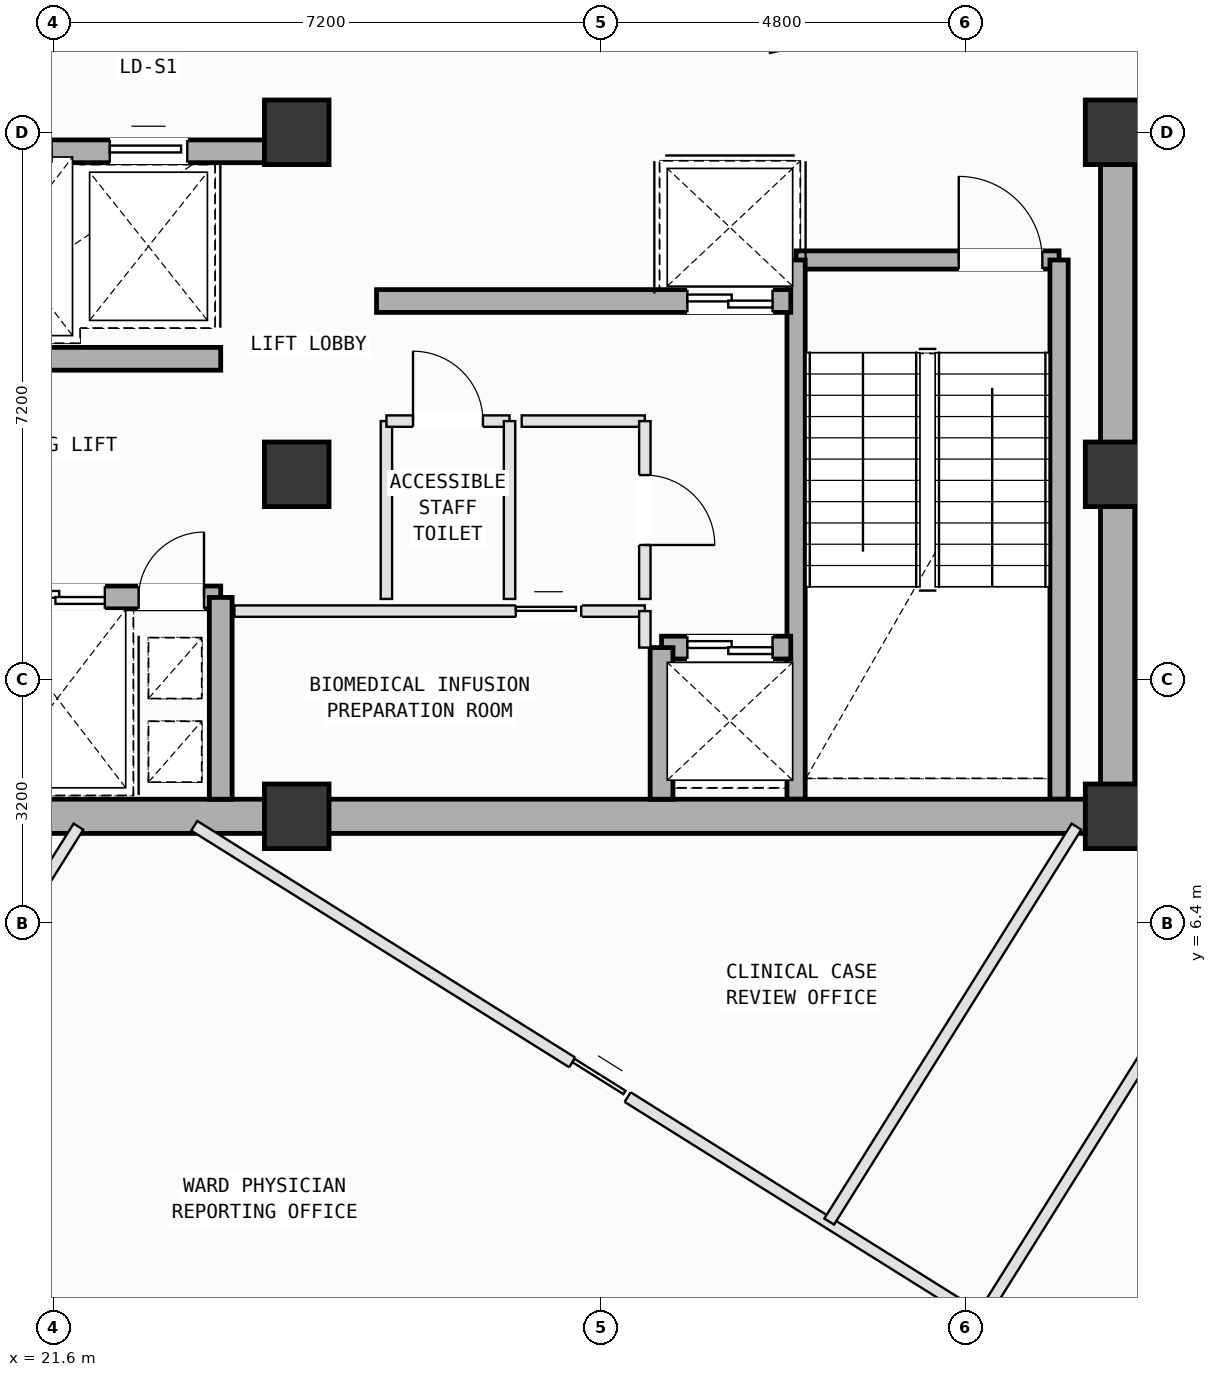
"""IFC4 building model, lengths in metres.
Left out: names, types, materials, properties, quantities, classifications, styles, units other than length and angle.
Written with IfcOpenShell. Run it as: python <this file> out.ifc"""

import sys

from ifc_helpers import new_model, si_unit, direction, frame, frame_2d, origin, origin_2d, place, context, subcontext, project, spatial, rectangle, extrude, element, fill, save


model = new_model("IFC4")
c1 = context("Model", 3, precision=1e-05, world=origin(), true_north=direction((0.0, 1.0)))
c2 = subcontext(c1, "Body", "Model", "MODEL_VIEW")
j1 = project(units=[si_unit("LENGTHUNIT", "METRE"), si_unit("PLANEANGLEUNIT", "RADIAN")], contexts=[c1])
p1 = place(None, origin())
s1 = spatial("IfcSite", under=j1, at=p1, CompositionType="ELEMENT")
p2 = place(p1, origin())
s2 = spatial("IfcBuilding", under=s1, at=p2, CompositionType="ELEMENT")
p3 = place(p2, frame((0.0, 0.0, 272.6)))
s3 = spatial("IfcBuildingStorey", under=s2, at=p3, CompositionType="ELEMENT", Elevation=272.6)
for number, where, z_axis, x_axis in (
    (1, (24.8, 7.8, 0.0), (0.0, 0.0, 1.0), (1.0, 0.0, 0.0)),
    (2, (24.8, 12.3, 0.0), (0.0, 0.0, 1.0), (1.0, 0.0, 0.0)),
    (3, (24.8, 16.8, 0.0), (0.0, 0.0, 1.0), (1.0, 0.0, 0.0)),
    (4, (35.6, 7.8, 0.0), (0.0, 0.0, 1.0), (1.0, 0.0, 0.0)),
    (5, (35.6, 12.3, 0.0), (0.0, 0.0, 1.0), (1.0, 0.0, 0.0)),
    (6, (35.6, 16.8, 0.0), (0.0, 0.0, 1.0), (1.0, 0.0, 0.0)),
):
    element("IfcColumn", number, at=place(p3, frame(where, z_axis=z_axis, x_axis=x_axis)), inside=s3, PredefinedType="COLUMN", context=c2, shape_type="SweptSolid", body=[
        extrude(rectangle(XDim=0.85, YDim=0.85, at=origin_2d()), origin(), (0.0, 0.0, 1.0), 4.0),
    ])
p4 = place(p3, frame((24.317, -1.774, 0.0), z_axis=(0.0, 0.0, 1.0), x_axis=(-0.847587721297, 0.530655306867, 0.0)))
e7 = element("IfcWall", 7, at=p4, inside=s3, PredefinedType="SOLIDWALL", context=c2, shape_type="SweptSolid", body=[
    extrude(rectangle(XDim=7.153, YDim=0.28, at=frame_2d((3.577, 0.0))), origin(), (0.0, 0.0, 1.0), 3.265),
])
p5 = place(p4, frame((2.813, 0.0, 0.75)))
e8 = element("IfcOpeningElement", 8, at=p5, cuts=e7, PredefinedType="OPENING", context=c2, shape_type="SweptSolid", body=[
    extrude(rectangle(XDim=1.2, YDim=1.75, at=frame_2d((0.6, 0.875))), frame((0.0, 0.15, 0.0), z_axis=(0.0, -1.0, 0.0), x_axis=(1.0, 0.0, 0.0)), (0.0, 0.0, 1.0), 0.3),
])
p6 = place(p4, frame((0.742, 0.0, 0.75)))
e9 = element("IfcOpeningElement", 9, at=p6, cuts=e7, PredefinedType="OPENING", context=c2, shape_type="SweptSolid", body=[
    extrude(rectangle(XDim=1.2, YDim=1.75, at=frame_2d((0.6, 0.875))), frame((0.0, 0.15, 0.0), z_axis=(0.0, -1.0, 0.0), x_axis=(1.0, 0.0, 0.0)), (0.0, 0.0, 1.0), 0.3),
])
p7 = place(p3, frame((31.37, 15.12, 0.0), z_axis=(0.0, 0.0, 1.0), x_axis=(1.0, 0.0, 0.0)))
e10 = element("IfcWall", 10, at=p7, inside=s3, PredefinedType="SOLIDWALL", context=c2, shape_type="SweptSolid", body=[
    extrude(rectangle(XDim=3.46, YDim=0.24, at=frame_2d((1.73, 0.0))), origin(), (0.0, 0.0, 1.0), 3.78),
])
p8 = place(p7, frame((2.14, 0.0, 0.0)))
e11 = element("IfcOpeningElement", 11, at=p8, cuts=e10, PredefinedType="OPENING", context=c2, shape_type="SweptSolid", body=[
    extrude(rectangle(XDim=1.1, YDim=2.15, at=frame_2d((0.55, 1.075))), frame((0.0, 0.13, 0.0), z_axis=(0.0, -1.0, 0.0), x_axis=(1.0, 0.0, 0.0)), (0.0, 0.0, 1.0), 0.26),
])
for number, where, z_axis, x_axis in (
    (12, (34.83, 15.12, 0.0), (0.0, 0.0, 1.0), (0.0, -1.0, 0.0)),
    (13, (31.37, 8.025, 0.0), (0.0, 0.0, 1.0), (0.0, 1.0, 0.0)),
):
    element("IfcWall", number, at=place(p3, frame(where, z_axis=z_axis, x_axis=x_axis)), inside=s3, PredefinedType="SOLIDWALL", context=c2, shape_type="SweptSolid", body=[
        extrude(rectangle(XDim=7.095, YDim=0.24, at=frame_2d((3.548, 0.0))), origin(), (0.0, 0.0, 1.0), 3.78),
    ])
for number, where, z_axis, x_axis in (
    (14, (14.0, 7.8, 0.0), (0.0, 0.0, 1.0), (1.0, 0.0, 0.0)),
    (15, (24.8, 7.8, 0.0), (0.0, 0.0, 1.0), (1.0, 0.0, 0.0)),
):
    element("IfcWall", number, at=place(p3, frame(where, z_axis=z_axis, x_axis=x_axis)), inside=s3, PredefinedType="SHEAR", context=c2, shape_type="SweptSolid", body=[
        extrude(rectangle(XDim=10.8, YDim=0.45, at=frame_2d((5.4, 0.0))), origin(), (0.0, 0.0, 1.0), 3.78),
    ])
p9 = place(p3, frame((35.6, 7.8, 0.0), z_axis=(0.0, 0.0, 1.0), x_axis=(0.0, 1.0, 0.0)))
e16 = element("IfcWall", 16, at=p9, inside=s3, PredefinedType="SHEAR", context=c2, shape_type="SweptSolid", body=[
    extrude(rectangle(XDim=9.0, YDim=0.45, at=frame_2d((4.5, 0.0))), origin(), (0.0, 0.0, 1.0), 3.78),
])
p10 = place(p3, frame((19.85, 16.55, 0.0), z_axis=(0.0, 0.0, 1.0), x_axis=(1.0, 0.0, 0.0)))
e17 = element("IfcWall", 17, at=p10, inside=s3, PredefinedType="SOLIDWALL", context=c2, shape_type="SweptSolid", body=[
    extrude(rectangle(XDim=4.525, YDim=0.3, at=frame_2d((2.262, 0.0))), origin(), (0.0, 0.0, 1.0), 3.78),
])
p11 = place(p10, frame((0.475, 0.0, 0.0)))
e18 = element("IfcOpeningElement", 18, at=p11, cuts=e17, PredefinedType="OPENING", context=c2, shape_type="SweptSolid", body=[
    extrude(rectangle(XDim=1.25, YDim=2.18, at=frame_2d((0.625, 1.09))), frame((0.0, 0.16, 0.0), z_axis=(0.0, -1.0, 0.0), x_axis=(1.0, 0.0, 0.0)), (0.0, 0.0, 1.0), 0.32),
])
p12 = place(p10, frame((2.49, 0.0, 0.0)))
e19 = element("IfcOpeningElement", 19, at=p12, cuts=e17, PredefinedType="OPENING", context=c2, shape_type="SweptSolid", body=[
    extrude(rectangle(XDim=1.02, YDim=2.12, at=frame_2d((0.51, 1.06))), frame((0.0, 0.16, 0.0), z_axis=(0.0, -1.0, 0.0), x_axis=(1.0, 0.0, 0.0)), (0.0, 0.0, 1.0), 0.32),
])
p13 = place(p3, frame((18.5, 10.68, 0.0), z_axis=(0.0, 0.0, 1.0), x_axis=(1.0, 0.0, 0.0)))
e20 = element("IfcWall", 20, at=p13, inside=s3, PredefinedType="SOLIDWALL", context=c2, shape_type="SweptSolid", body=[
    extrude(rectangle(XDim=5.3, YDim=0.3, at=frame_2d((2.65, 0.0))), origin(), (0.0, 0.0, 1.0), 3.78),
])
p14 = place(p13, frame((4.22, 0.0, 0.0)))
e21 = element("IfcOpeningElement", 21, at=p14, cuts=e20, PredefinedType="OPENING", context=c2, shape_type="SweptSolid", body=[
    extrude(rectangle(XDim=0.86, YDim=2.06, at=frame_2d((0.43, 1.03))), frame((0.0, 0.16, 0.0), z_axis=(0.0, -1.0, 0.0), x_axis=(1.0, 0.0, 0.0)), (0.0, 0.0, 1.0), 0.32),
])
p15 = place(p13, frame((0.425, 0.0, 0.0)))
e22 = element("IfcOpeningElement", 22, at=p15, cuts=e20, PredefinedType="OPENING", context=c2, shape_type="SweptSolid", body=[
    extrude(rectangle(XDim=1.25, YDim=2.18, at=frame_2d((0.625, 1.09))), frame((0.0, 0.16, 0.0), z_axis=(0.0, -1.0, 0.0), x_axis=(1.0, 0.0, 0.0)), (0.0, 0.0, 1.0), 0.32),
])
p16 = place(p13, frame((2.525, 0.0, 0.0)))
e23 = element("IfcOpeningElement", 23, at=p16, cuts=e20, PredefinedType="OPENING", context=c2, shape_type="SweptSolid", body=[
    extrude(rectangle(XDim=1.25, YDim=2.18, at=frame_2d((0.625, 1.09))), frame((0.0, 0.16, 0.0), z_axis=(0.0, -1.0, 0.0), x_axis=(1.0, 0.0, 0.0)), (0.0, 0.0, 1.0), 0.32),
])
p17 = place(p3, frame((18.5, 13.82, 0.0), z_axis=(0.0, 0.0, 1.0), x_axis=(1.0, 0.0, 0.0)))
e24 = element("IfcWall", 24, at=p17, inside=s3, PredefinedType="SOLIDWALL", context=c2, shape_type="SweptSolid", body=[
    extrude(rectangle(XDim=5.3, YDim=0.3, at=frame_2d((2.65, 0.0))), origin(), (0.0, 0.0, 1.0), 3.78),
])
p18 = place(p17, frame((0.18, 0.0, 0.0)))
e25 = element("IfcOpeningElement", 25, at=p18, cuts=e24, PredefinedType="OPENING", context=c2, shape_type="SweptSolid", body=[
    extrude(rectangle(XDim=1.1, YDim=2.15, at=frame_2d((0.55, 1.075))), frame((0.0, 0.16, 0.0), z_axis=(0.0, -1.0, 0.0), x_axis=(1.0, 0.0, 0.0)), (0.0, 0.0, 1.0), 0.32),
])
p19 = place(p3, frame((23.8, 8.025, 0.0), z_axis=(0.0, 0.0, 1.0), x_axis=(0.0, 1.0, 0.0)))
e26 = element("IfcWall", 26, at=p19, inside=s3, PredefinedType="SOLIDWALL", context=c2, shape_type="SweptSolid", body=[
    extrude(rectangle(XDim=2.655, YDim=0.3, at=frame_2d((1.328, 0.0))), origin(), (0.0, 0.0, 1.0), 3.78),
])
p20 = place(p3, frame((29.6, 10.02, 0.0), z_axis=(0.0, 0.0, 1.0), x_axis=(1.0, 0.0, 0.0)))
e27 = element("IfcWall", 27, at=p20, inside=s3, PredefinedType="SOLIDWALL", context=c2, shape_type="SweptSolid", body=[
    extrude(rectangle(XDim=1.7, YDim=0.3, at=frame_2d((0.85, 0.0))), origin(), (0.0, 0.0, 1.0), 3.78),
])
p21 = place(p20, frame((0.34, 0.0, 0.0)))
e28 = element("IfcOpeningElement", 28, at=p21, cuts=e27, PredefinedType="OPENING", context=c2, shape_type="SweptSolid", body=[
    extrude(rectangle(XDim=1.12, YDim=2.15, at=frame_2d((0.56, 1.075))), frame((0.0, 0.16, 0.0), z_axis=(0.0, -1.0, 0.0), x_axis=(1.0, 0.0, 0.0)), (0.0, 0.0, 1.0), 0.32),
])
p22 = place(p3, frame((29.6, 8.025, 0.0), z_axis=(0.0, 0.0, 1.0), x_axis=(0.0, 1.0, 0.0)))
e29 = element("IfcWall", 29, at=p22, inside=s3, PredefinedType="SOLIDWALL", context=c2, shape_type="SweptSolid", body=[
    extrude(rectangle(XDim=1.995, YDim=0.3, at=frame_2d((0.998, 0.0))), origin(), (0.0, 0.0, 1.0), 3.78),
])
p23 = place(p3, frame((25.85, 14.58, 0.0), z_axis=(0.0, 0.0, 1.0), x_axis=(1.0, 0.0, 0.0)))
e30 = element("IfcWall", 30, at=p23, inside=s3, PredefinedType="SOLIDWALL", context=c2, shape_type="SweptSolid", body=[
    extrude(rectangle(XDim=5.45, YDim=0.3, at=frame_2d((2.725, 0.0))), origin(), (0.0, 0.0, 1.0), 3.78),
])
p24 = place(p23, frame((4.09, 0.0, 0.0)))
e31 = element("IfcOpeningElement", 31, at=p24, cuts=e30, PredefinedType="OPENING", context=c2, shape_type="SweptSolid", body=[
    extrude(rectangle(XDim=1.12, YDim=2.15, at=frame_2d((0.56, 1.075))), frame((0.0, 0.16, 0.0), z_axis=(0.0, -1.0, 0.0), x_axis=(1.0, 0.0, 0.0)), (0.0, 0.0, 1.0), 0.32),
])
p25 = place(p3, frame((23.98, 10.5, 0.0), z_axis=(0.0, 0.0, 1.0), x_axis=(1.0, 0.0, 0.0)))
e32 = element("IfcWall", 32, at=p25, inside=s3, PredefinedType="PARTITIONING", context=c2, shape_type="SweptSolid", body=[
    extrude(rectangle(XDim=5.4, YDim=0.15, at=frame_2d((2.7, 0.0))), origin(), (0.0, 0.0, 1.0), 3.78),
])
p26 = place(p25, frame((3.703, 0.0, 0.0)))
e33 = element("IfcOpeningElement", 33, at=p26, cuts=e32, PredefinedType="OPENING", context=c2, shape_type="SweptSolid", body=[
    extrude(rectangle(XDim=0.86, YDim=2.06, at=frame_2d((0.43, 1.03))), frame((0.0, 0.085, 0.0), z_axis=(0.0, -1.0, 0.0), x_axis=(1.0, 0.0, 0.0)), (0.0, 0.0, 1.0), 0.17),
])
p27 = place(p3, frame((29.38, 10.5, 0.0), z_axis=(0.0, 0.0, 1.0), x_axis=(0.0, -1.0, 0.0)))
e34 = element("IfcWall", 34, at=p27, inside=s3, PredefinedType="PARTITIONING", context=c2, shape_type="SweptSolid", body=[
    extrude(rectangle(XDim=0.48, YDim=0.15, at=frame_2d((0.24, 0.0))), origin(), (0.0, 0.0, 1.0), 3.78),
])
p28 = place(p3, frame((25.98, 10.66, 0.0), z_axis=(0.0, 0.0, 1.0), x_axis=(0.0, 1.0, 0.0)))
e35 = element("IfcWall", 35, at=p28, inside=s3, PredefinedType="PARTITIONING", context=c2, shape_type="SweptSolid", body=[
    extrude(rectangle(XDim=2.34, YDim=0.15, at=frame_2d((1.17, 0.0))), origin(), (0.0, 0.0, 1.0), 3.78),
])
p29 = place(p3, frame((25.98, 13.0, 0.0), z_axis=(0.0, 0.0, 1.0), x_axis=(1.0, 0.0, 0.0)))
e36 = element("IfcWall", 36, at=p29, inside=s3, PredefinedType="PARTITIONING", context=c2, shape_type="SweptSolid", body=[
    extrude(rectangle(XDim=1.62, YDim=0.15, at=frame_2d((0.81, 0.0))), origin(), (0.0, 0.0, 1.0), 3.78),
])
p30 = place(p29, frame((0.35, 0.0, 0.0)))
e37 = element("IfcOpeningElement", 37, at=p30, cuts=e36, PredefinedType="OPENING", context=c2, shape_type="SweptSolid", body=[
    extrude(rectangle(XDim=0.92, YDim=2.1, at=frame_2d((0.46, 1.05))), frame((0.0, 0.085, 0.0), z_axis=(0.0, -1.0, 0.0), x_axis=(1.0, 0.0, 0.0)), (0.0, 0.0, 1.0), 0.17),
])
p31 = place(p3, frame((27.6, 13.0, 0.0), z_axis=(0.0, 0.0, 1.0), x_axis=(0.0, -1.0, 0.0)))
e38 = element("IfcWall", 38, at=p31, inside=s3, PredefinedType="PARTITIONING", context=c2, shape_type="SweptSolid", body=[
    extrude(rectangle(XDim=2.34, YDim=0.15, at=frame_2d((1.17, 0.0))), origin(), (0.0, 0.0, 1.0), 3.78),
])
p32 = place(p3, frame((27.76, 13.0, 0.0), z_axis=(0.0, 0.0, 1.0), x_axis=(1.0, 0.0, 0.0)))
e39 = element("IfcWall", 39, at=p32, inside=s3, PredefinedType="PARTITIONING", context=c2, shape_type="SweptSolid", body=[
    extrude(rectangle(XDim=1.62, YDim=0.15, at=frame_2d((0.81, 0.0))), origin(), (0.0, 0.0, 1.0), 3.78),
])
p33 = place(p3, frame((29.38, 13.0, 0.0), z_axis=(0.0, 0.0, 1.0), x_axis=(0.0, -1.0, 0.0)))
e40 = element("IfcWall", 40, at=p33, inside=s3, PredefinedType="PARTITIONING", context=c2, shape_type="SweptSolid", body=[
    extrude(rectangle(XDim=2.34, YDim=0.15, at=frame_2d((1.17, 0.0))), origin(), (0.0, 0.0, 1.0), 3.78),
])
p34 = place(p33, frame((0.71, 0.0, 0.0)))
e41 = element("IfcOpeningElement", 41, at=p34, cuts=e40, PredefinedType="OPENING", context=c2, shape_type="SweptSolid", body=[
    extrude(rectangle(XDim=0.92, YDim=2.1, at=frame_2d((0.46, 1.05))), frame((0.0, 0.085, 0.0), z_axis=(0.0, -1.0, 0.0), x_axis=(1.0, 0.0, 0.0)), (0.0, 0.0, 1.0), 0.17),
])
p35 = place(p3, frame((29.859, -5.108, 0.0), z_axis=(0.0, 0.0, 1.0), x_axis=(0.530618227444, 0.847610934748, 0.0)))
e42 = element("IfcWall", 42, at=p35, inside=s3, PredefinedType="PARTITIONING", context=c2, shape_type="SweptSolid", body=[
    extrude(rectangle(XDim=11.975, YDim=0.15, at=frame_2d((5.987, 0.0))), origin(), (0.0, 0.0, 1.0), 2.765),
])
p36 = place(p3, frame((19.411, 3.645, 0.0), z_axis=(0.0, 0.0, 1.0), x_axis=(0.530785412047, 0.847506251515, 0.0)))
e43 = element("IfcWall", 43, at=p36, inside=s3, PredefinedType="PARTITIONING", context=c2, shape_type="SweptSolid", body=[
    extrude(rectangle(XDim=4.742, YDim=0.15, at=frame_2d((2.371, 0.0))), origin(), (0.0, 0.0, 1.0), 3.78),
])
p37 = place(p36, frame((1.844, 0.0, 0.0)))
e44 = element("IfcOpeningElement", 44, at=p37, cuts=e43, PredefinedType="OPENING", context=c2, shape_type="SweptSolid", body=[
    extrude(rectangle(XDim=0.86, YDim=2.06, at=frame_2d((0.43, 1.03))), frame((0.0, 0.085, 0.0), z_axis=(0.0, -1.0, 0.0), x_axis=(1.0, 0.0, 0.0)), (0.0, 0.0, 1.0), 0.17),
])
p38 = place(p3, frame((23.452, 7.675, 0.0), z_axis=(0.0, 0.0, 1.0), x_axis=(0.847604512147, -0.530628486786, 0.0)))
e45 = element("IfcWall", 45, at=p38, inside=s3, PredefinedType="PARTITIONING", context=c2, shape_type="SweptSolid", body=[
    extrude(rectangle(XDim=11.954, YDim=0.15, at=frame_2d((5.977, 0.0))), origin(), (0.0, 0.0, 1.0), 3.415),
])
p39 = place(p38, frame((5.867, 0.0, 0.0)))
e46 = element("IfcOpeningElement", 46, at=p39, cuts=e45, PredefinedType="OPENING", context=c2, shape_type="SweptSolid", body=[
    extrude(rectangle(XDim=0.86, YDim=2.06, at=frame_2d((0.43, 1.03))), frame((0.0, 0.085, 0.0), z_axis=(0.0, -1.0, 0.0), x_axis=(1.0, 0.0, 0.0)), (0.0, 0.0, 1.0), 0.17),
])
p40 = place(p3, frame((35.059, 7.664, 0.0), z_axis=(0.0, 0.0, 1.0), x_axis=(-0.530661027952, -0.84758413943, 0.0)))
e47 = element("IfcWall", 47, at=p40, inside=s3, PredefinedType="PARTITIONING", context=c2, shape_type="SweptSolid", body=[
    extrude(rectangle(XDim=6.13, YDim=0.15, at=frame_2d((3.065, 0.0))), origin(), (0.0, 0.0, 1.0), 2.765),
])
p41 = place(p8, origin())
e48 = element("IfcDoor", 48, at=p41, inside=s3, OperationType="SINGLE_SWING_LEFT", PredefinedType="DOOR", context=c2, shape_type="SweptSolid", body=[
    extrude(rectangle(XDim=1.1, YDim=2.15, at=frame_2d((0.55, 1.075))), frame((0.0, 0.025, 0.0), z_axis=(0.0, -1.0, 0.0), x_axis=(1.0, 0.0, 0.0)), (0.0, 0.0, 1.0), 0.05),
])
fill(e11, e48)
p42 = place(p14, origin())
e49 = element("IfcDoor", 49, at=p42, inside=s3, OperationType="SINGLE_SWING_RIGHT", PredefinedType="DOOR", context=c2, shape_type="SweptSolid", body=[
    extrude(rectangle(XDim=0.86, YDim=2.06, at=frame_2d((0.43, 1.03))), frame((0.0, 0.025, 0.0), z_axis=(0.0, -1.0, 0.0), x_axis=(1.0, 0.0, 0.0)), (0.0, 0.0, 1.0), 0.05),
])
fill(e21, e49)
p43 = place(p16, origin())
e50 = element("IfcDoor", 50, at=p43, inside=s3, OperationType="DOUBLE_DOOR_SLIDING", PredefinedType="DOOR", context=c2, shape_type="SweptSolid", body=[
    extrude(rectangle(XDim=1.25, YDim=2.18, at=frame_2d((0.625, 1.09))), frame((0.0, 0.025, 0.0), z_axis=(0.0, -1.0, 0.0), x_axis=(1.0, 0.0, 0.0)), (0.0, 0.0, 1.0), 0.05),
])
fill(e23, e50)
p44 = place(p21, origin())
e51 = element("IfcDoor", 51, at=p44, inside=s3, OperationType="DOUBLE_DOOR_SLIDING", PredefinedType="DOOR", context=c2, shape_type="SweptSolid", body=[
    extrude(rectangle(XDim=1.12, YDim=2.15, at=frame_2d((0.56, 1.075))), frame((0.0, 0.025, 0.0), z_axis=(0.0, -1.0, 0.0), x_axis=(1.0, 0.0, 0.0)), (0.0, 0.0, 1.0), 0.05),
])
fill(e28, e51)
p45 = place(p24, origin())
e52 = element("IfcDoor", 52, at=p45, inside=s3, OperationType="DOUBLE_DOOR_SLIDING", PredefinedType="DOOR", context=c2, shape_type="SweptSolid", body=[
    extrude(rectangle(XDim=1.12, YDim=2.15, at=frame_2d((0.56, 1.075))), frame((0.0, 0.025, 0.0), z_axis=(0.0, -1.0, 0.0), x_axis=(1.0, 0.0, 0.0)), (0.0, 0.0, 1.0), 0.05),
])
fill(e31, e52)
p46 = place(p12, origin())
e53 = element("IfcDoor", 53, at=p46, inside=s3, OperationType="SLIDING_TO_LEFT", PredefinedType="DOOR", context=c2, shape_type="SweptSolid", body=[
    extrude(rectangle(XDim=1.02, YDim=2.12, at=frame_2d((0.51, 1.06))), frame((0.0, 0.025, 0.0), z_axis=(0.0, -1.0, 0.0), x_axis=(1.0, 0.0, 0.0)), (0.0, 0.0, 1.0), 0.05),
])
fill(e19, e53)
p47 = place(p30, origin())
e54 = element("IfcDoor", 54, at=p47, inside=s3, OperationType="SINGLE_SWING_LEFT", PredefinedType="DOOR", context=c2, shape_type="SweptSolid", body=[
    extrude(rectangle(XDim=0.92, YDim=2.1, at=frame_2d((0.46, 1.05))), frame((0.0, 0.025, 0.0), z_axis=(0.0, -1.0, 0.0), x_axis=(1.0, 0.0, 0.0)), (0.0, 0.0, 1.0), 0.05),
])
fill(e37, e54)
p48 = place(p34, origin())
e55 = element("IfcDoor", 55, at=p48, inside=s3, OperationType="SINGLE_SWING_RIGHT", PredefinedType="DOOR", context=c2, shape_type="SweptSolid", body=[
    extrude(rectangle(XDim=0.92, YDim=2.1, at=frame_2d((0.46, 1.05))), frame((0.0, 0.025, 0.0), z_axis=(0.0, -1.0, 0.0), x_axis=(1.0, 0.0, 0.0)), (0.0, 0.0, 1.0), 0.05),
])
fill(e41, e55)
p49 = place(p26, origin())
e56 = element("IfcDoor", 56, at=p49, inside=s3, OperationType="SLIDING_TO_LEFT", PredefinedType="DOOR", context=c2, shape_type="SweptSolid", body=[
    extrude(rectangle(XDim=0.86, YDim=2.06, at=frame_2d((0.43, 1.03))), frame((0.0, 0.025, 0.0), z_axis=(0.0, -1.0, 0.0), x_axis=(1.0, 0.0, 0.0)), (0.0, 0.0, 1.0), 0.05),
])
fill(e33, e56)
p50 = place(p39, origin())
e57 = element("IfcDoor", 57, at=p50, inside=s3, OperationType="SLIDING_TO_LEFT", PredefinedType="DOOR", context=c2, shape_type="SweptSolid", body=[
    extrude(rectangle(XDim=0.86, YDim=2.06, at=frame_2d((0.43, 1.03))), frame((0.0, 0.025, 0.0), z_axis=(0.0, -1.0, 0.0), x_axis=(1.0, 0.0, 0.0)), (0.0, 0.0, 1.0), 0.05),
])
fill(e46, e57)
save(model, sys.argv[1])
